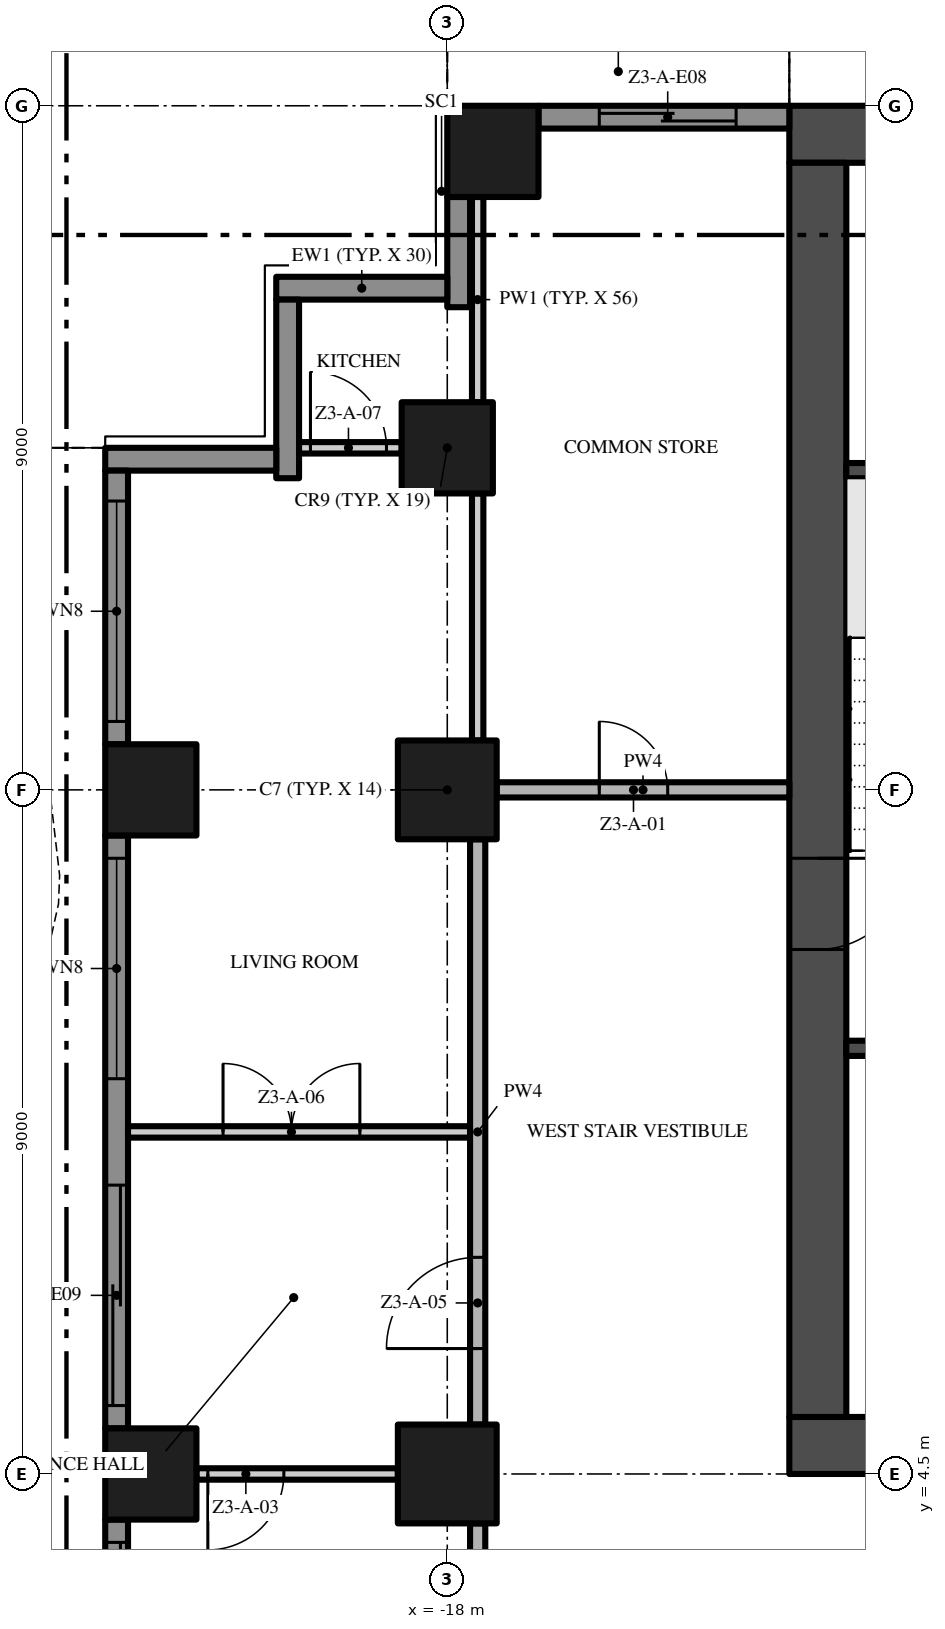
"""IFC4 building model, lengths in metres.
Left out: names, types, materials, properties, quantities, classifications, styles, units other than length and angle.
Written with IfcOpenShell. Run it as: python <this file> out.ifc"""

import sys

from ifc_helpers import new_model, si_unit, direction, frame, frame_2d, origin, origin_2d, place, context, subcontext, project, spatial, polyline, rectangle, outline, extrude, element, fill, save


model = new_model("IFC4")
c1 = context("Model", 3, precision=1e-05, world=origin(), true_north=direction((0.0, 1.0)))
c2 = subcontext(c1, "Body", "Model", "MODEL_VIEW")
j1 = project(units=[si_unit("LENGTHUNIT", "METRE"), si_unit("PLANEANGLEUNIT", "RADIAN")], contexts=[c1])
p1 = place(None, origin())
s1 = spatial("IfcSite", under=j1, at=p1, CompositionType="ELEMENT")
p2 = place(p1, origin())
s2 = spatial("IfcBuilding", under=s1, at=p2, CompositionType="ELEMENT")
p3 = place(p2, frame((0.0, 0.0, 125.0)))
s3 = spatial("IfcBuildingStorey", under=s2, at=p3, CompositionType="ELEMENT", Elevation=125.0)
p4 = place(p3, frame((-13.5, 4.875, -0.3), z_axis=(0.0, 0.0, 1.0), x_axis=(1.0, 0.0, 0.0)))
e1 = element("IfcWall", 1, at=p4, inside=s3, PredefinedType="SHEAR", context=c2, shape_type="SweptSolid", body=[
    extrude(rectangle(XDim=27.0, YDim=0.75, at=frame_2d((13.5, 0.0))), origin(), (0.0, 0.0, 1.0), 3.8),
])
p5 = place(p4, frame((12.0, 0.0, 0.3)))
e2 = element("IfcOpeningElement", 2, at=p5, cuts=e1, PredefinedType="OPENING", context=c2, shape_type="SweptSolid", body=[
    extrude(rectangle(XDim=3.0, YDim=2.4, at=frame_2d((1.5, 1.2))), frame((0.0, 0.385, 0.0), z_axis=(0.0, -1.0, 0.0), x_axis=(1.0, 0.0, 0.0)), (0.0, 0.0, 1.0), 0.77),
])
p6 = place(p4, frame((4.9, 0.0, 0.3)))
e3 = element("IfcOpeningElement", 3, at=p6, cuts=e1, PredefinedType="OPENING", context=c2, shape_type="SweptSolid", body=[
    extrude(rectangle(XDim=1.2, YDim=2.2, at=frame_2d((0.6, 1.1))), frame((0.0, 0.385, 0.0), z_axis=(0.0, -1.0, 0.0), x_axis=(1.0, 0.0, 0.0)), (0.0, 0.0, 1.0), 0.77),
])
p7 = place(p4, frame((20.75, 0.0, 0.3)))
e4 = element("IfcOpeningElement", 4, at=p7, cuts=e1, PredefinedType="OPENING", context=c2, shape_type="SweptSolid", body=[
    extrude(rectangle(XDim=1.5, YDim=2.2, at=frame_2d((0.75, 1.1))), frame((0.0, 0.385, 0.0), z_axis=(0.0, -1.0, 0.0), x_axis=(1.0, 0.0, 0.0)), (0.0, 0.0, 1.0), 0.77),
])
p8 = place(p4, frame((17.4, 0.0, 0.3)))
e5 = element("IfcOpeningElement", 5, at=p8, cuts=e1, PredefinedType="OPENING", context=c2, shape_type="SweptSolid", body=[
    extrude(rectangle(XDim=1.2, YDim=2.2, at=frame_2d((0.6, 1.1))), frame((0.0, 0.385, 0.0), z_axis=(0.0, -1.0, 0.0), x_axis=(1.0, 0.0, 0.0)), (0.0, 0.0, 1.0), 0.77),
])
p9 = place(p3, frame((13.5, 22.125, -0.3), z_axis=(0.0, 0.0, 1.0), x_axis=(-1.0, 0.0, 0.0)))
e6 = element("IfcWall", 6, at=p9, inside=s3, PredefinedType="SHEAR", context=c2, shape_type="SweptSolid", body=[
    extrude(rectangle(XDim=27.0, YDim=0.75, at=frame_2d((13.5, 0.0))), origin(), (0.0, 0.0, 1.0), 3.8),
])
p10 = place(p3, frame((-13.125, 21.75, -0.3), z_axis=(0.0, 0.0, 1.0), x_axis=(0.0, -1.0, 0.0)))
e7 = element("IfcWall", 7, at=p10, inside=s3, PredefinedType="SHEAR", context=c2, shape_type="SweptSolid", body=[
    extrude(rectangle(XDim=16.5, YDim=0.75, at=frame_2d((8.25, 0.0))), origin(), (0.0, 0.0, 1.0), 3.8),
])
p11 = place(p10, frame((9.15, 0.0, 0.3)))
e8 = element("IfcOpeningElement", 8, at=p11, cuts=e7, PredefinedType="OPENING", context=c2, shape_type="SweptSolid", body=[
    extrude(rectangle(XDim=1.2, YDim=2.2, at=frame_2d((0.6, 1.1))), frame((0.0, 0.385, 0.0), z_axis=(0.0, -1.0, 0.0), x_axis=(1.0, 0.0, 0.0)), (0.0, 0.0, 1.0), 0.77),
])
p12 = place(p3, frame((-18.0, 13.5, 0.0), z_axis=(0.0, 0.0, 1.0), x_axis=(1.0, 0.0, 0.0)))
e9 = element("IfcColumn", 9, at=p12, inside=s3, PredefinedType="COLUMN", context=c2, shape_type="SweptSolid", body=[
    extrude(rectangle(XDim=1.3, YDim=1.3, at=origin_2d()), origin(), (0.0, 0.0, 1.0), 3.5),
])
p13 = place(p3, frame((-17.4, 21.9, 0.0), z_axis=(0.0, 0.0, 1.0), x_axis=(1.0, 0.0, 0.0)))
e10 = element("IfcColumn", 10, at=p13, inside=s3, PredefinedType="COLUMN", context=c2, shape_type="SweptSolid", body=[
    extrude(rectangle(XDim=1.2, YDim=1.2, at=origin_2d()), origin(), (0.0, 0.0, 1.0), 3.5),
])
p14 = place(p3, frame((-18.0, 4.5, 0.0), z_axis=(0.0, 0.0, 1.0), x_axis=(1.0, 0.0, 0.0)))
e11 = element("IfcColumn", 11, at=p14, inside=s3, PredefinedType="COLUMN", context=c2, shape_type="SweptSolid", body=[
    extrude(rectangle(XDim=1.3, YDim=1.3, at=origin_2d()), origin(), (0.0, 0.0, 1.0), 3.5),
])
for number, where, z_axis, x_axis in (
    (12, (-21.9, 13.5, 0.0), (0.0, 0.0, 1.0), (1.0, 0.0, 0.0)),
    (13, (-18.0, 18.0, 0.0), (0.0, 0.0, 1.0), (1.0, 0.0, 0.0)),
    (14, (-21.9, 4.5, 0.0), (0.0, 0.0, 1.0), (1.0, 0.0, 0.0)),
):
    element("IfcColumn", number, at=place(p3, frame(where, z_axis=z_axis, x_axis=x_axis)), inside=s3, PredefinedType="COLUMN", context=c2, shape_type="SweptSolid", body=[
        extrude(rectangle(XDim=1.2, YDim=1.2, at=origin_2d()), origin(), (0.0, 0.0, 1.0), 3.5),
    ])
p15 = place(p3, frame((-16.8, 22.35, 0.0), z_axis=(0.0, 0.0, 1.0), x_axis=(1.0, 0.0, 0.0)))
e15 = element("IfcWall", 15, at=p15, inside=s3, PredefinedType="SOLIDWALL", context=c2, shape_type="SweptSolid", body=[
    extrude(rectangle(XDim=3.3, YDim=0.3, at=frame_2d((1.65, 0.0))), origin(), (0.0, 0.0, 1.0), 3.5),
])
p16 = place(p15, frame((0.8, 0.0, 0.0)))
e16 = element("IfcOpeningElement", 16, at=p16, cuts=e15, PredefinedType="OPENING", context=c2, shape_type="SweptSolid", body=[
    extrude(rectangle(XDim=1.8, YDim=2.4, at=frame_2d((0.9, 1.2))), frame((0.0, 0.16, 0.0), z_axis=(0.0, -1.0, 0.0), x_axis=(1.0, 0.0, 0.0)), (0.0, 0.0, 1.0), 0.32),
])
p17 = place(p3, frame((-17.85, 19.85, 0.0), z_axis=(0.0, 0.0, 1.0), x_axis=(0.0, 1.0, 0.0)))
e17 = element("IfcWall", 17, at=p17, inside=s3, PredefinedType="SOLIDWALL", context=c2, shape_type="SweptSolid", body=[
    extrude(rectangle(XDim=1.45, YDim=0.3, at=frame_2d((0.725, 0.0))), origin(), (0.0, 0.0, 1.0), 3.5),
])
p18 = place(p3, frame((-20.25, 20.1, 0.0), z_axis=(0.0, 0.0, 1.0), x_axis=(1.0, 0.0, 0.0)))
e18 = element("IfcWall", 18, at=p18, inside=s3, PredefinedType="SOLIDWALL", context=c2, shape_type="SweptSolid", body=[
    extrude(rectangle(XDim=2.25, YDim=0.3, at=frame_2d((1.125, 0.0))), origin(), (0.0, 0.0, 1.0), 3.5),
])
p19 = place(p3, frame((-20.1, 17.6, 0.0), z_axis=(0.0, 0.0, 1.0), x_axis=(0.0, 1.0, 0.0)))
e19 = element("IfcWall", 19, at=p19, inside=s3, PredefinedType="SOLIDWALL", context=c2, shape_type="SweptSolid", body=[
    extrude(rectangle(XDim=2.35, YDim=0.3, at=frame_2d((1.175, 0.0))), origin(), (0.0, 0.0, 1.0), 3.5),
])
p20 = place(p3, frame((-22.5, 17.85, 0.0), z_axis=(0.0, 0.0, 1.0), x_axis=(1.0, 0.0, 0.0)))
e20 = element("IfcWall", 20, at=p20, inside=s3, PredefinedType="SOLIDWALL", context=c2, shape_type="SweptSolid", body=[
    extrude(rectangle(XDim=2.25, YDim=0.3, at=frame_2d((1.125, 0.0))), origin(), (0.0, 0.0, 1.0), 3.5),
])
p21 = place(p3, frame((-22.35, 14.1, 0.0), z_axis=(0.0, 0.0, 1.0), x_axis=(0.0, 1.0, 0.0)))
e21 = element("IfcWall", 21, at=p21, inside=s3, PredefinedType="SOLIDWALL", context=c2, shape_type="SweptSolid", body=[
    extrude(rectangle(XDim=3.6, YDim=0.3, at=frame_2d((1.8, 0.0))), origin(), (0.0, 0.0, 1.0), 3.5),
])
p22 = place(p21, frame((0.3, 0.0, 0.45)))
e22 = element("IfcOpeningElement", 22, at=p22, cuts=e21, PredefinedType="OPENING", context=c2, shape_type="SweptSolid", body=[
    extrude(rectangle(XDim=2.9, YDim=2.65, at=frame_2d((1.45, 1.325))), frame((0.0, 0.16, 0.0), z_axis=(0.0, -1.0, 0.0), x_axis=(1.0, 0.0, 0.0)), (0.0, 0.0, 1.0), 0.32),
])
p23 = place(p3, frame((-22.35, 5.1, 0.0), z_axis=(0.0, 0.0, 1.0), x_axis=(0.0, 1.0, 0.0)))
e23 = element("IfcWall", 23, at=p23, inside=s3, PredefinedType="SOLIDWALL", context=c2, shape_type="SweptSolid", body=[
    extrude(rectangle(XDim=7.8, YDim=0.3, at=frame_2d((3.9, 0.0))), origin(), (0.0, 0.0, 1.0), 3.5),
])
p24 = place(p23, frame((4.6, 0.0, 0.45)))
e24 = element("IfcOpeningElement", 24, at=p24, cuts=e23, PredefinedType="OPENING", context=c2, shape_type="SweptSolid", body=[
    extrude(rectangle(XDim=2.9, YDim=2.65, at=frame_2d((1.45, 1.325))), frame((0.0, 0.16, 0.0), z_axis=(0.0, -1.0, 0.0), x_axis=(1.0, 0.0, 0.0)), (0.0, 0.0, 1.0), 0.32),
])
p25 = place(p23, frame((0.3, 0.0, 0.0)))
e25 = element("IfcOpeningElement", 25, at=p25, cuts=e23, PredefinedType="OPENING", context=c2, shape_type="SweptSolid", body=[
    extrude(rectangle(XDim=2.9, YDim=2.4, at=frame_2d((1.45, 1.2))), frame((0.0, 0.16, 0.0), z_axis=(0.0, -1.0, 0.0), x_axis=(1.0, 0.0, 0.0)), (0.0, 0.0, 1.0), 0.32),
])
p26 = place(p3, frame((-22.35, -3.9, 0.0), z_axis=(0.0, 0.0, 1.0), x_axis=(0.0, 1.0, 0.0)))
e26 = element("IfcWall", 26, at=p26, inside=s3, PredefinedType="SOLIDWALL", context=c2, shape_type="SweptSolid", body=[
    extrude(rectangle(XDim=7.8, YDim=0.3, at=frame_2d((3.9, 0.0))), origin(), (0.0, 0.0, 1.0), 3.5),
])
p27 = place(p26, frame((4.6, 0.0, 0.0)))
e27 = element("IfcOpeningElement", 27, at=p27, cuts=e26, PredefinedType="OPENING", context=c2, shape_type="SweptSolid", body=[
    extrude(rectangle(XDim=2.9, YDim=2.4, at=frame_2d((1.45, 1.2))), frame((0.0, 0.16, 0.0), z_axis=(0.0, -1.0, 0.0), x_axis=(1.0, 0.0, 0.0)), (0.0, 0.0, 1.0), 0.32),
])
p28 = place(p26, frame((0.3, 0.0, 0.45)))
e28 = element("IfcOpeningElement", 28, at=p28, cuts=e26, PredefinedType="OPENING", context=c2, shape_type="SweptSolid", body=[
    extrude(rectangle(XDim=2.9, YDim=2.65, at=frame_2d((1.45, 1.325))), frame((0.0, 0.16, 0.0), z_axis=(0.0, -1.0, 0.0), x_axis=(1.0, 0.0, 0.0)), (0.0, 0.0, 1.0), 0.32),
])
p29 = place(p3, origin())
e29 = element("IfcWall", 29, at=p29, inside=s3, PredefinedType="USERDEFINED", context=c2, shape_type="SweptSolid", body=[
    extrude(outline(polyline([(-13.5, 25.149), (-15.0, 24.488), (-16.5, 23.755), (-18.0, 23.231), (-17.917, 22.995), (-16.404, 23.524), (-14.895, 24.261), (-13.399, 24.92), (-13.5, 25.149)])), origin(), (0.0, 0.0, 1.0), 0.9),
])
p30 = place(p3, origin())
e30 = element("IfcWall", 30, at=p30, inside=s3, PredefinedType="USERDEFINED", context=c2, shape_type="SweptSolid", body=[
    extrude(outline(polyline([(-25.149, 18.0), (-24.488, 16.5), (-23.755, 15.0), (-23.231, 13.5), (-23.1, 12.375), (-23.115, 12.0), (-23.451, 10.5), (-24.112, 9.0), (-24.845, 7.5), (-25.369, 6.0), (-25.5, 4.875), (-25.485, 4.5), (-25.149, 3.0), (-24.488, 1.5), (-23.755, 0.0), (-23.231, -1.5), (-23.1, -2.625), (-23.115, -3.0), (-23.451, -4.5), (-24.112, -6.0), (-24.845, -7.5), (-25.369, -9.0), (-25.5, -10.125), (-25.485, -10.5), (-25.149, -12.0), (-24.488, -13.5), (-24.259, -13.399), (-24.91, -11.921), (-25.236, -10.467), (-25.249, -10.135), (-25.124, -9.056), (-24.614, -7.596), (-23.885, -6.105), (-23.213, -4.579), (-22.866, -3.033), (-22.849, -2.615), (-22.986, -1.444), (-23.524, 0.096), (-24.261, 1.605), (-24.91, 3.079), (-25.236, 4.533), (-25.249, 4.865), (-25.124, 5.944), (-24.614, 7.404), (-23.885, 8.895), (-23.213, 10.421), (-22.866, 11.967), (-22.849, 12.385), (-22.986, 13.556), (-23.524, 15.096), (-24.261, 16.605), (-24.92, 18.101), (-25.149, 18.0)])), origin(), (0.0, 0.0, 1.0), 0.9),
])
for number, where, z_axis, x_axis in (
    (31, (-12.75, 10.1, 0.0), (0.0, 0.0, 1.0), (1.0, 0.0, 0.0)),
    (32, (-12.75, 17.7, 0.0), (0.0, 0.0, 1.0), (1.0, 0.0, 0.0)),
):
    element("IfcWall", number, at=place(p3, frame(where, z_axis=z_axis, x_axis=x_axis)), inside=s3, PredefinedType="SHEAR", context=c2, shape_type="SweptSolid", body=[
        extrude(rectangle(XDim=3.1, YDim=0.2, at=frame_2d((1.55, 0.0))), origin(), (0.0, 0.0, 1.0), 3.5),
    ])
p31 = place(p3, frame((-18.65, 4.5, 0.0), z_axis=(0.0, 0.0, 1.0), x_axis=(-1.0, 0.0, 0.0)))
e33 = element("IfcWall", 33, at=p31, inside=s3, PredefinedType="PARTITIONING", context=c2, shape_type="SweptSolid", body=[
    extrude(rectangle(XDim=2.65, YDim=0.15, at=frame_2d((1.325, 0.0))), origin(), (0.0, 0.0, 1.0), 3.5),
])
p32 = place(p31, frame((1.5, 0.0, 0.0)))
e34 = element("IfcOpeningElement", 34, at=p32, cuts=e33, PredefinedType="OPENING", context=c2, shape_type="SweptSolid", body=[
    extrude(rectangle(XDim=1.0, YDim=2.4, at=frame_2d((0.5, 1.2))), frame((0.0, 0.085, 0.0), z_axis=(0.0, -1.0, 0.0), x_axis=(1.0, 0.0, 0.0)), (0.0, 0.0, 1.0), 0.17),
])
p33 = place(p3, frame((-22.2, 9.0, 0.0), z_axis=(0.0, 0.0, 1.0), x_axis=(1.0, 0.0, 0.0)))
e35 = element("IfcWall", 35, at=p33, inside=s3, PredefinedType="PARTITIONING", context=c2, shape_type="SweptSolid", body=[
    extrude(rectangle(XDim=4.5, YDim=0.15, at=frame_2d((2.25, 0.0))), origin(), (0.0, 0.0, 1.0), 3.5),
])
p34 = place(p33, frame((1.25, 0.0, 0.0)))
e36 = element("IfcOpeningElement", 36, at=p34, cuts=e35, PredefinedType="OPENING", context=c2, shape_type="SweptSolid", body=[
    extrude(rectangle(XDim=1.8, YDim=2.4, at=frame_2d((0.9, 1.2))), frame((0.0, 0.085, 0.0), z_axis=(0.0, -1.0, 0.0), x_axis=(1.0, 0.0, 0.0)), (0.0, 0.0, 1.0), 0.17),
])
p35 = place(p3, frame((-17.35, 13.5, 0.0), z_axis=(0.0, 0.0, 1.0), x_axis=(1.0, 0.0, 0.0)))
e37 = element("IfcWall", 37, at=p35, inside=s3, PredefinedType="PARTITIONING", context=c2, shape_type="SweptSolid", body=[
    extrude(rectangle(XDim=3.85, YDim=0.2, at=frame_2d((1.925, 0.0))), origin(), (0.0, 0.0, 1.0), 3.5),
])
p36 = place(p35, frame((1.35, 0.0, 0.0)))
e38 = element("IfcOpeningElement", 38, at=p36, cuts=e37, PredefinedType="OPENING", context=c2, shape_type="SweptSolid", body=[
    extrude(rectangle(XDim=0.9, YDim=2.1, at=frame_2d((0.45, 1.05))), frame((0.0, 0.11, 0.0), z_axis=(0.0, -1.0, 0.0), x_axis=(1.0, 0.0, 0.0)), (0.0, 0.0, 1.0), 0.22),
])
p37 = place(p3, frame((-19.95, 18.0, 0.0), z_axis=(0.0, 0.0, 1.0), x_axis=(1.0, 0.0, 0.0)))
e39 = element("IfcWall", 39, at=p37, inside=s3, PredefinedType="PARTITIONING", context=c2, shape_type="SweptSolid", body=[
    extrude(rectangle(XDim=1.35, YDim=0.15, at=frame_2d((0.675, 0.0))), origin(), (0.0, 0.0, 1.0), 3.5),
])
p38 = place(p37, frame((0.15, 0.0, 0.0)))
e40 = element("IfcOpeningElement", 40, at=p38, cuts=e39, PredefinedType="OPENING", context=c2, shape_type="SweptSolid", body=[
    extrude(rectangle(XDim=1.0, YDim=2.4, at=frame_2d((0.5, 1.2))), frame((0.0, 0.085, 0.0), z_axis=(0.0, -1.0, 0.0), x_axis=(1.0, 0.0, 0.0)), (0.0, 0.0, 1.0), 0.17),
])
p39 = place(p3, frame((-17.6, -0.2, 0.0), z_axis=(0.0, 0.0, 1.0), x_axis=(0.0, 1.0, 0.0)))
e41 = element("IfcWall", 41, at=p39, inside=s3, PredefinedType="PARTITIONING", context=c2, shape_type="SweptSolid", body=[
    extrude(rectangle(XDim=4.05, YDim=0.2, at=frame_2d((2.025, 0.0))), origin(), (0.0, 0.0, 1.0), 3.5),
])
p40 = place(p3, frame((-17.6, 5.15, 0.0), z_axis=(0.0, 0.0, 1.0), x_axis=(0.0, 1.0, 0.0)))
e42 = element("IfcWall", 42, at=p40, inside=s3, PredefinedType="PARTITIONING", context=c2, shape_type="SweptSolid", body=[
    extrude(rectangle(XDim=7.7, YDim=0.2, at=frame_2d((3.85, 0.0))), origin(), (0.0, 0.0, 1.0), 3.5),
])
p41 = place(p40, frame((1.0, 0.0, 0.0)))
e43 = element("IfcOpeningElement", 43, at=p41, cuts=e42, PredefinedType="OPENING", context=c2, shape_type="SweptSolid", body=[
    extrude(rectangle(XDim=1.2, YDim=2.4, at=frame_2d((0.6, 1.2))), frame((0.0, 0.11, 0.0), z_axis=(0.0, -1.0, 0.0), x_axis=(1.0, 0.0, 0.0)), (0.0, 0.0, 1.0), 0.22),
])
p42 = place(p3, frame((-17.6, 14.15, 0.0), z_axis=(0.0, 0.0, 1.0), x_axis=(0.0, 1.0, 0.0)))
e44 = element("IfcWall", 44, at=p42, inside=s3, PredefinedType="PARTITIONING", context=c2, shape_type="SweptSolid", body=[
    extrude(rectangle(XDim=3.25, YDim=0.15, at=frame_2d((1.625, 0.0))), origin(), (0.0, 0.0, 1.0), 3.5),
])
p43 = place(p3, frame((-17.6, 18.6, 0.0), z_axis=(0.0, 0.0, 1.0), x_axis=(0.0, 1.0, 0.0)))
e45 = element("IfcWall", 45, at=p43, inside=s3, PredefinedType="PARTITIONING", context=c2, shape_type="SweptSolid", body=[
    extrude(rectangle(XDim=2.7, YDim=0.15, at=frame_2d((1.35, 0.0))), origin(), (0.0, 0.0, 1.0), 3.5),
])
p44 = place(p16, origin())
e46 = element("IfcDoor", 46, at=p44, inside=s3, OperationType="SINGLE_SWING_LEFT", PredefinedType="DOOR", context=c2, shape_type="SweptSolid", body=[
    extrude(rectangle(XDim=1.8, YDim=2.4, at=frame_2d((0.9, 1.2))), frame((0.0, 0.025, 0.0), z_axis=(0.0, -1.0, 0.0), x_axis=(1.0, 0.0, 0.0)), (0.0, 0.0, 1.0), 0.05),
])
fill(e16, e46)
p45 = place(p22, origin())
e47 = element("IfcWindow", 47, at=p45, inside=s3, PartitioningType="SINGLE_PANEL", PredefinedType="WINDOW", context=c2, shape_type="SweptSolid", body=[
    extrude(rectangle(XDim=2.9, YDim=2.65, at=frame_2d((1.45, 1.325))), frame((0.0, 0.03, 0.0), z_axis=(0.0, -1.0, 0.0), x_axis=(1.0, 0.0, 0.0)), (0.0, 0.0, 1.0), 0.06),
])
fill(e22, e47)
p46 = place(p24, origin())
e48 = element("IfcWindow", 48, at=p46, inside=s3, PartitioningType="SINGLE_PANEL", PredefinedType="WINDOW", context=c2, shape_type="SweptSolid", body=[
    extrude(rectangle(XDim=2.9, YDim=2.65, at=frame_2d((1.45, 1.325))), frame((0.0, 0.03, 0.0), z_axis=(0.0, -1.0, 0.0), x_axis=(1.0, 0.0, 0.0)), (0.0, 0.0, 1.0), 0.06),
])
fill(e24, e48)
p47 = place(p25, origin())
e49 = element("IfcDoor", 49, at=p47, inside=s3, OperationType="SINGLE_SWING_LEFT", PredefinedType="DOOR", context=c2, shape_type="SweptSolid", body=[
    extrude(rectangle(XDim=2.9, YDim=2.4, at=frame_2d((1.45, 1.2))), frame((0.0, 0.025, 0.0), z_axis=(0.0, -1.0, 0.0), x_axis=(1.0, 0.0, 0.0)), (0.0, 0.0, 1.0), 0.05),
])
fill(e25, e49)
p48 = place(p27, origin())
e50 = element("IfcDoor", 50, at=p48, inside=s3, OperationType="SINGLE_SWING_LEFT", PredefinedType="DOOR", context=c2, shape_type="SweptSolid", body=[
    extrude(rectangle(XDim=2.9, YDim=2.4, at=frame_2d((1.45, 1.2))), frame((0.0, 0.025, 0.0), z_axis=(0.0, -1.0, 0.0), x_axis=(1.0, 0.0, 0.0)), (0.0, 0.0, 1.0), 0.05),
])
fill(e27, e50)
p49 = place(p11, frame((1.2, 0.0, 0.0), z_axis=(0.0, 0.0, 1.0), x_axis=(-1.0, 0.0, 0.0)))
e51 = element("IfcDoor", 51, at=p49, inside=s3, OperationType="SINGLE_SWING_RIGHT", PredefinedType="DOOR", context=c2, shape_type="SweptSolid", body=[
    extrude(rectangle(XDim=1.2, YDim=2.2, at=frame_2d((0.6, 1.1))), frame((0.0, 0.025, 0.0), z_axis=(0.0, -1.0, 0.0), x_axis=(1.0, 0.0, 0.0)), (0.0, 0.0, 1.0), 0.05),
])
fill(e8, e51)
p50 = place(p36, origin())
e52 = element("IfcDoor", 52, at=p50, inside=s3, OperationType="SINGLE_SWING_LEFT", PredefinedType="DOOR", context=c2, shape_type="SweptSolid", body=[
    extrude(rectangle(XDim=0.9, YDim=2.1, at=frame_2d((0.45, 1.05))), frame((0.0, 0.025, 0.0), z_axis=(0.0, -1.0, 0.0), x_axis=(1.0, 0.0, 0.0)), (0.0, 0.0, 1.0), 0.05),
])
fill(e38, e52)
p51 = place(p32, origin())
e53 = element("IfcDoor", 53, at=p51, inside=s3, OperationType="SINGLE_SWING_RIGHT", PredefinedType="DOOR", context=c2, shape_type="SweptSolid", body=[
    extrude(rectangle(XDim=1.0, YDim=2.4, at=frame_2d((0.5, 1.2))), frame((0.0, 0.025, 0.0), z_axis=(0.0, -1.0, 0.0), x_axis=(1.0, 0.0, 0.0)), (0.0, 0.0, 1.0), 0.05),
])
fill(e34, e53)
p52 = place(p41, origin())
e54 = element("IfcDoor", 54, at=p52, inside=s3, OperationType="SINGLE_SWING_LEFT", PredefinedType="DOOR", context=c2, shape_type="SweptSolid", body=[
    extrude(rectangle(XDim=1.2, YDim=2.4, at=frame_2d((0.6, 1.2))), frame((0.0, 0.025, 0.0), z_axis=(0.0, -1.0, 0.0), x_axis=(1.0, 0.0, 0.0)), (0.0, 0.0, 1.0), 0.05),
])
fill(e43, e54)
p53 = place(p34, origin())
e55 = element("IfcDoor", 55, at=p53, inside=s3, OperationType="DOUBLE_DOOR_SINGLE_SWING", PredefinedType="DOOR", context=c2, shape_type="SweptSolid", body=[
    extrude(rectangle(XDim=1.8, YDim=2.4, at=frame_2d((0.9, 1.2))), frame((0.0, 0.025, 0.0), z_axis=(0.0, -1.0, 0.0), x_axis=(1.0, 0.0, 0.0)), (0.0, 0.0, 1.0), 0.05),
])
fill(e36, e55)
p54 = place(p38, origin())
e56 = element("IfcDoor", 56, at=p54, inside=s3, OperationType="SINGLE_SWING_LEFT", PredefinedType="DOOR", context=c2, shape_type="SweptSolid", body=[
    extrude(rectangle(XDim=1.0, YDim=2.4, at=frame_2d((0.5, 1.2))), frame((0.0, 0.025, 0.0), z_axis=(0.0, -1.0, 0.0), x_axis=(1.0, 0.0, 0.0)), (0.0, 0.0, 1.0), 0.05),
])
fill(e40, e56)
save(model, sys.argv[1])
